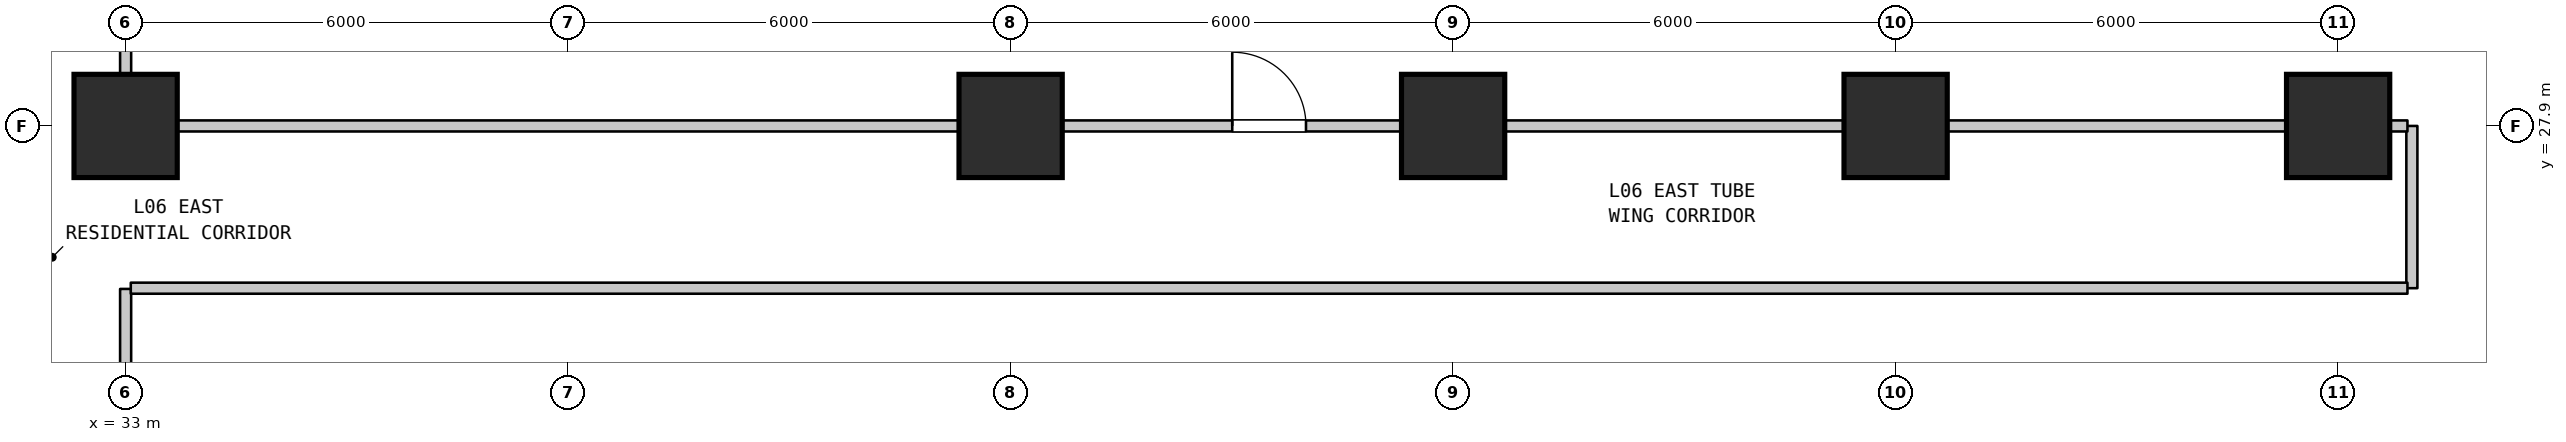
"""IFC4 building model, lengths in metres.
Left out: names, types, materials, properties, quantities, classifications, styles, units other than length and angle.
Written with IfcOpenShell. Run it as: python <this file> out.ifc"""

import sys

from ifc_helpers import new_model, si_unit, direction, frame, frame_2d, origin, origin_2d, place, context, subcontext, project, spatial, rectangle, extrude, element, fill, save


model = new_model("IFC4")
c1 = context("Model", 3, precision=1e-05, world=origin(), true_north=direction((0.0, 1.0)))
c2 = subcontext(c1, "Body", "Model", "MODEL_VIEW")
j1 = project(units=[si_unit("LENGTHUNIT", "METRE"), si_unit("PLANEANGLEUNIT", "RADIAN")], contexts=[c1])
p1 = place(None, origin())
s1 = spatial("IfcSite", under=j1, at=p1, CompositionType="ELEMENT")
p2 = place(p1, origin())
s2 = spatial("IfcBuilding", under=s1, at=p2, CompositionType="ELEMENT")
p3 = place(p2, frame((0.0, 0.0, 31.4)))
s3 = spatial("IfcBuildingStorey", under=s2, at=p3, CompositionType="ELEMENT", Elevation=31.4)
for number, where, z_axis, x_axis in (
    (1, (33.0, 27.9, 0.0), (0.0, 0.0, 1.0), (1.0, 0.0, 0.0)),
    (2, (45.0, 27.9, 0.0), (0.0, 0.0, 1.0), (1.0, 0.0, 0.0)),
    (3, (51.0, 27.9, 0.0), (0.0, 0.0, 1.0), (1.0, 0.0, 0.0)),
    (4, (57.0, 27.9, 0.0), (0.0, 0.0, 1.0), (1.0, 0.0, 0.0)),
    (5, (63.0, 27.9, 0.0), (0.0, 0.0, 1.0), (1.0, 0.0, 0.0)),
):
    element("IfcColumn", number, at=place(p3, frame(where, z_axis=z_axis, x_axis=x_axis)), inside=s3, PredefinedType="COLUMN", context=c2, shape_type="SweptSolid", body=[
        extrude(rectangle(XDim=1.4, YDim=1.4, at=origin_2d()), origin(), (0.0, 0.0, 1.0), 3.7),
    ])
p4 = place(p3, frame((33.0, 19.66, 0.0), z_axis=(0.0, 0.0, 1.0), x_axis=(0.0, 1.0, 0.0)))
e6 = element("IfcWall", 6, at=p4, inside=s3, PredefinedType="STANDARD", context=c2, shape_type="SweptSolid", body=[
    extrude(rectangle(XDim=6.03, YDim=0.15, at=frame_2d((3.015, 0.0))), origin(), (0.0, 0.0, 1.0), 2.885),
])
p5 = place(p3, frame((33.0, 27.91, 0.0), z_axis=(0.0, 0.0, 1.0), x_axis=(0.0, 1.0, 0.0)))
e7 = element("IfcWall", 7, at=p5, inside=s3, PredefinedType="STANDARD", context=c2, shape_type="SweptSolid", body=[
    extrude(rectangle(XDim=9.98, YDim=0.15, at=frame_2d((4.99, 0.0))), origin(), (0.0, 0.0, 1.0), 2.885),
])
p6 = place(p3, frame((64.0, 25.7, 0.0), z_axis=(0.0, 0.0, 1.0), x_axis=(0.0, 1.0, 0.0)))
e8 = element("IfcWall", 8, at=p6, inside=s3, PredefinedType="STANDARD", context=c2, shape_type="SweptSolid", body=[
    extrude(rectangle(XDim=2.2, YDim=0.15, at=frame_2d((1.1, 0.0))), origin(), (0.0, 0.0, 1.0), 3.385),
])
p7 = place(p3, frame((33.07, 25.7, 0.0), z_axis=(0.0, 0.0, 1.0), x_axis=(1.0, 0.0, 0.0)))
e9 = element("IfcWall", 9, at=p7, inside=s3, PredefinedType="STANDARD", context=c2, shape_type="SweptSolid", body=[
    extrude(rectangle(XDim=30.87, YDim=0.15, at=frame_2d((15.435, 0.0))), origin(), (0.0, 0.0, 1.0), 3.385),
])
p8 = place(p3, frame((33.07, 27.9, 0.0), z_axis=(0.0, 0.0, 1.0), x_axis=(1.0, 0.0, 0.0)))
e10 = element("IfcWall", 10, at=p8, inside=s3, PredefinedType="STANDARD", context=c2, shape_type="SweptSolid", body=[
    extrude(rectangle(XDim=30.87, YDim=0.15, at=frame_2d((15.435, 0.0))), origin(), (0.0, 0.0, 1.0), 2.885),
])
p9 = place(p8, frame((14.935, 0.0, 0.0)))
e11 = element("IfcOpeningElement", 11, at=p9, cuts=e10, PredefinedType="OPENING", context=c2, shape_type="SweptSolid", body=[
    extrude(rectangle(XDim=1.0, YDim=2.15, at=frame_2d((0.5, 1.075))), frame((0.0, 0.085, 0.0), z_axis=(0.0, -1.0, 0.0), x_axis=(1.0, 0.0, 0.0)), (0.0, 0.0, 1.0), 0.17),
])
p10 = place(p9, origin())
e12 = element("IfcDoor", 12, at=p10, inside=s3, OperationType="SINGLE_SWING_LEFT", PredefinedType="DOOR", context=c2, shape_type="SweptSolid", body=[
    extrude(rectangle(XDim=1.0, YDim=2.15, at=frame_2d((0.5, 1.075))), frame((0.0, 0.025, 0.0), z_axis=(0.0, -1.0, 0.0), x_axis=(1.0, 0.0, 0.0)), (0.0, 0.0, 1.0), 0.05),
])
fill(e11, e12)
save(model, sys.argv[1])
